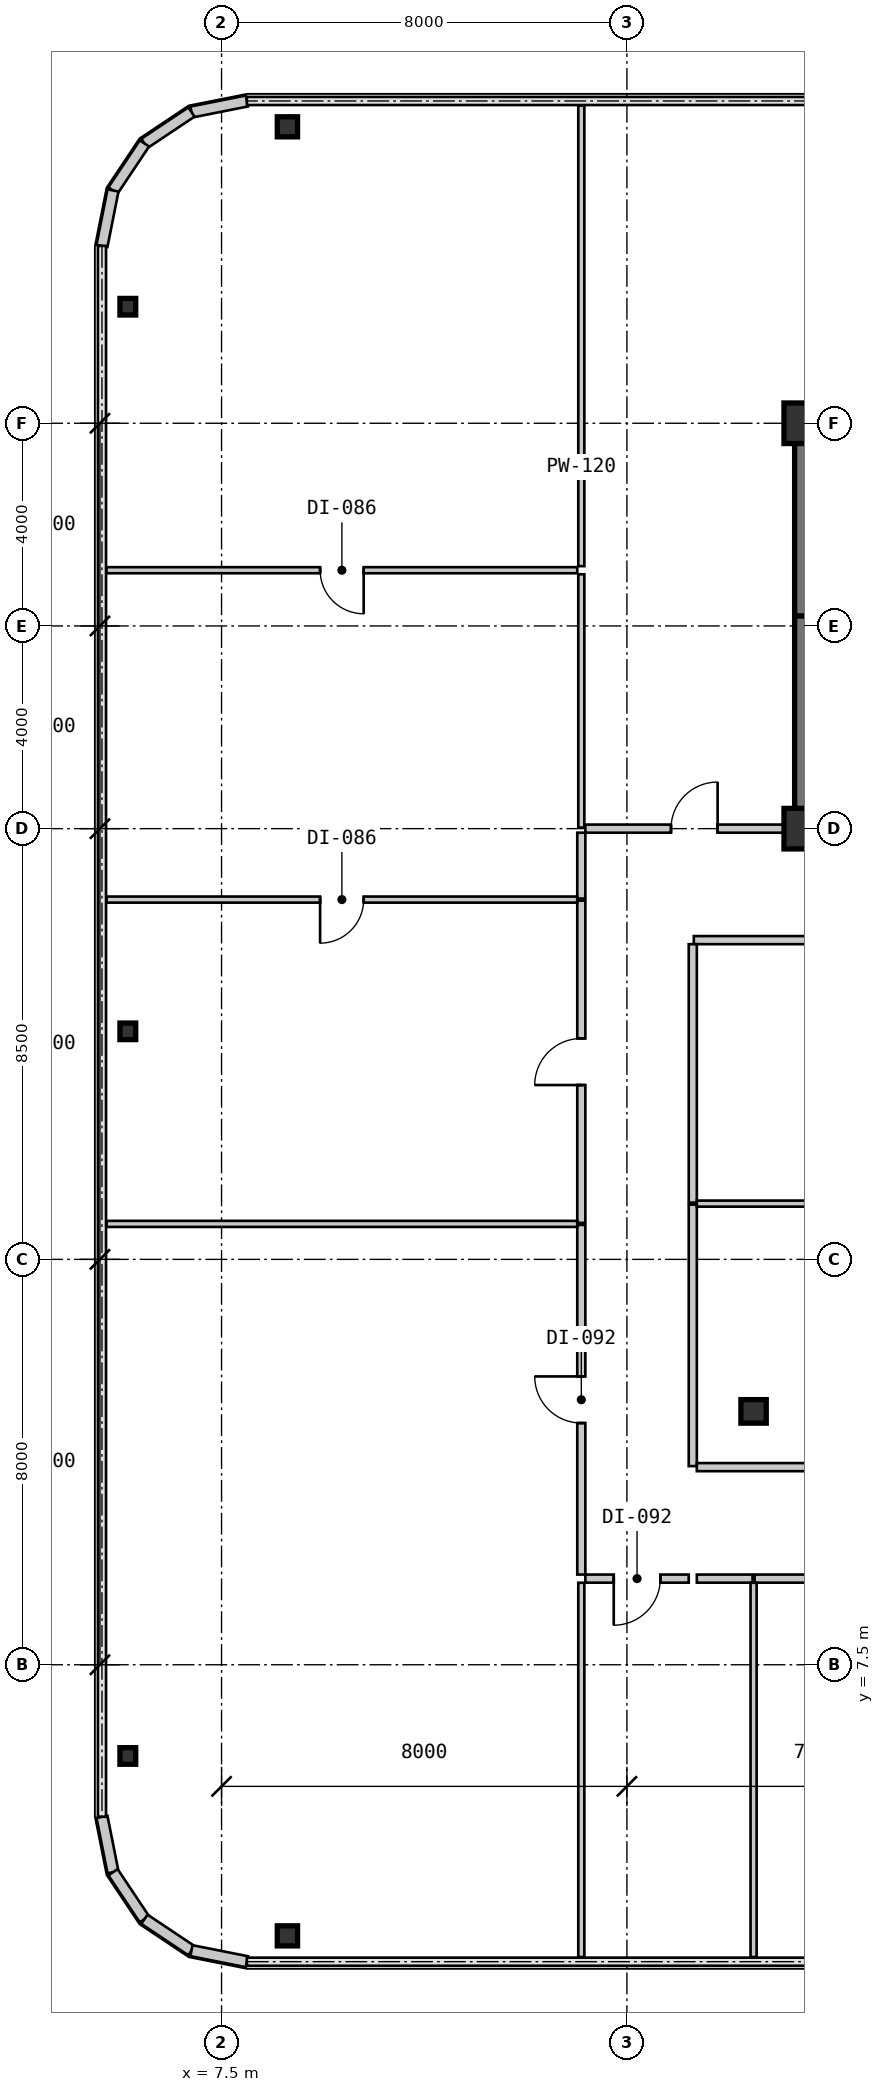
"""IFC4 building model, lengths in metres.
Left out: names, types, materials, properties, quantities, classifications, styles, units other than length and angle.
Written with IfcOpenShell. Run it as: python <this file> out.ifc"""

import sys

from ifc_helpers import new_model, si_unit, direction, frame, frame_2d, origin, origin_2d, place, context, subcontext, project, spatial, rectangle, i_section, extrude, source, transform, mapped, element, fill, save


model = new_model("IFC4")
c1 = context("Model", 3, precision=1e-05, world=origin(), true_north=direction((0.0, 1.0)))
c2 = subcontext(c1, "Body", "Model", "MODEL_VIEW")
j1 = project(units=[si_unit("LENGTHUNIT", "METRE"), si_unit("PLANEANGLEUNIT", "RADIAN")], contexts=[c1])
p1 = place(None, origin())
s1 = spatial("IfcSite", under=j1, at=p1, CompositionType="ELEMENT")
p2 = place(p1, origin())
s2 = spatial("IfcBuilding", under=s1, at=p2, CompositionType="ELEMENT")
p3 = place(p2, frame((0.0, 0.0, 45.15)))
s3 = spatial("IfcBuildingStorey", under=s2, at=p3, CompositionType="ELEMENT", Elevation=45.15)
m1 = source(origin(), c2, "Body", "SweptSolid", [
    extrude(rectangle(XDim=0.8, YDim=0.8, at=origin_2d()), origin(), (0.0, 0.0, 1.0), 3.15),
])
for number, where, z_axis, x_axis in (
    (1, (19.0, 24.0, 0.0), (0.0, 0.0, 1.0), (1.0, 0.0, 0.0)),
    (2, (19.0, 32.0, 0.0), (0.0, 0.0, 1.0), (1.0, 0.0, 0.0)),
):
    element("IfcColumn", number, at=place(p3, frame(where, z_axis=z_axis, x_axis=x_axis)), inside=s3, PredefinedType="COLUMN", context=c2, shape_type="MappedRepresentation", body=[
        mapped(m1, transform((0.0, 0.0, 0.0), scale=1.0)),
    ])
m2 = source(origin(), c2, "Body", "SweptSolid", [
    extrude(i_section(OverallWidth=0.5, OverallDepth=0.464, WebThickness=0.022, FlangeThickness=0.034, at=origin_2d()), origin(), (0.0, 0.0, 1.0), 3.15),
])
p4 = place(p3, frame((18.0, 12.5, 0.0), z_axis=(0.0, 0.0, 1.0), x_axis=(1.0, 0.0, 0.0)))
e3 = element("IfcColumn", 3, at=p4, inside=s3, PredefinedType="COLUMN", context=c2, shape_type="MappedRepresentation", body=[
    mapped(m2, transform((0.0, 0.0, 0.0), scale=1.0)),
])
m3 = source(origin(), c2, "Body", "SweptSolid", [
    extrude(i_section(OverallWidth=0.4, OverallDepth=0.396, WebThickness=0.022, FlangeThickness=0.034, at=origin_2d()), origin(), (0.0, 0.0, 1.0), 3.15),
])
for number, where, z_axis, x_axis in (
    (4, (8.8, 2.15, 0.0), (0.0, 0.0, 1.0), (1.0, 0.0, 0.0)),
    (5, (8.8, 37.85, 0.0), (0.0, 0.0, 1.0), (1.0, 0.0, 0.0)),
):
    element("IfcColumn", number, at=place(p3, frame(where, z_axis=z_axis, x_axis=x_axis)), inside=s3, PredefinedType="COLUMN", context=c2, shape_type="MappedRepresentation", body=[
        mapped(m3, transform((0.0, 0.0, 0.0), scale=1.0)),
    ])
m4 = source(origin(), c2, "Body", "SweptSolid", [
    extrude(i_section(OverallWidth=0.311, OverallDepth=0.327, WebThickness=0.016, FlangeThickness=0.025, at=origin_2d()), origin(), (0.0, 0.0, 1.0), 3.15),
])
for number, where, z_axis, x_axis in (
    (6, (5.65, 5.7, 0.0), (0.0, 0.0, 1.0), (1.0, 0.0, 0.0)),
    (7, (5.65, 20.0, 0.0), (0.0, 0.0, 1.0), (1.0, 0.0, 0.0)),
    (8, (5.65, 34.3, 0.0), (0.0, 0.0, 1.0), (1.0, 0.0, 0.0)),
):
    element("IfcColumn", number, at=place(p3, frame(where, z_axis=z_axis, x_axis=x_axis)), inside=s3, PredefinedType="COLUMN", context=c2, shape_type="MappedRepresentation", body=[
        mapped(m4, transform((0.0, 0.0, 0.0), scale=1.0)),
    ])
m5 = source(origin(), c2, "Body", "SweptSolid", [
    extrude(rectangle(XDim=1.116, YDim=0.22, at=frame_2d((0.558, 0.0))), origin(), (0.0, 0.0, 1.0), 2.93),
])
for number, where, z_axis, x_axis in (
    (9, (8.0, 38.36, 0.0), (0.0, 0.0, 1.0), (-0.981, -0.195, 0.0)),
    (10, (6.906, 38.142, 0.0), (0.0, 0.0, 1.0), (-0.831, -0.556, 0.0)),
    (11, (5.978, 37.522, 0.0), (0.0, 0.0, 1.0), (-0.556, -0.831, 0.0)),
    (12, (5.358, 36.594, 0.0), (0.0, 0.0, 1.0), (-0.195, -0.981, 0.0)),
    (13, (5.14, 4.5, 0.0), (0.0, 0.0, 1.0), (0.195, -0.981, 0.0)),
    (14, (5.358, 3.406, 0.0), (0.0, 0.0, 1.0), (0.556, -0.831, 0.0)),
    (15, (5.978, 2.478, 0.0), (0.0, 0.0, 1.0), (0.831, -0.556, 0.0)),
    (16, (6.906, 1.858, 0.0), (0.0, 0.0, 1.0), (0.981, -0.195, 0.0)),
):
    element("IfcWall", number, at=place(p3, frame(where, z_axis=z_axis, x_axis=x_axis)), inside=s3, PredefinedType="SOLIDWALL", context=c2, shape_type="MappedRepresentation", body=[
        mapped(m5, transform((0.0, 0.0, 0.0), scale=1.0)),
    ])
m6 = source(origin(), c2, "Body", "SweptSolid", [
    extrude(rectangle(XDim=9.19, YDim=0.38, at=frame_2d((4.595, 0.0))), origin(), (0.0, 0.0, 1.0), 2.93),
])
p5 = place(p3, frame((18.81, 32.0, 0.0), z_axis=(0.0, 0.0, 1.0), x_axis=(1.0, 0.0, 0.0)))
e17 = element("IfcWall", 17, at=p5, inside=s3, PredefinedType="SHEAR", context=c2, shape_type="MappedRepresentation", body=[
    mapped(m6, transform((0.0, 0.0, 0.0), scale=1.0)),
])
m7 = source(origin(), c2, "Body", "SweptSolid", [
    extrude(rectangle(XDim=4.01, YDim=0.38, at=frame_2d((2.005, 0.0))), origin(), (0.0, 0.0, 1.0), 2.93),
])
p6 = place(p3, frame((19.0, 24.19, 0.0), z_axis=(0.0, 0.0, 1.0), x_axis=(0.0, 1.0, 0.0)))
e18 = element("IfcWall", 18, at=p6, inside=s3, PredefinedType="SHEAR", context=c2, shape_type="MappedRepresentation", body=[
    mapped(m7, transform((0.0, 0.0, 0.0), scale=1.0)),
])
m8 = source(origin(), c2, "Body", "SweptSolid", [
    extrude(rectangle(XDim=3.61, YDim=0.38, at=frame_2d((1.805, 0.0))), origin(), (0.0, 0.0, 1.0), 2.93),
])
p7 = place(p3, frame((19.0, 28.2, 0.0), z_axis=(0.0, 0.0, 1.0), x_axis=(0.0, 1.0, 0.0)))
e19 = element("IfcWall", 19, at=p7, inside=s3, PredefinedType="SHEAR", context=c2, shape_type="MappedRepresentation", body=[
    mapped(m8, transform((0.0, 0.0, 0.0), scale=1.0)),
])
m9 = source(origin(), c2, "Body", "SweptSolid", [
    extrude(rectangle(XDim=4.98, YDim=0.38, at=frame_2d((2.49, 0.0))), origin(), (0.0, 0.0, 1.0), 2.93),
])
p8 = place(p3, frame((18.81, 24.0, 0.0), z_axis=(0.0, 0.0, 1.0), x_axis=(1.0, 0.0, 0.0)))
e20 = element("IfcWall", 20, at=p8, inside=s3, PredefinedType="SHEAR", context=c2, shape_type="MappedRepresentation", body=[
    mapped(m9, transform((0.0, 0.0, 0.0), scale=1.0)),
])
m10 = source(origin(), c2, "Body", "SweptSolid", [
    extrude(rectangle(XDim=5.16, YDim=0.16, at=frame_2d((2.58, 0.0))), origin(), (0.0, 0.0, 1.0), 2.93),
])
p9 = place(p3, frame((16.8, 16.58, 0.0), z_axis=(0.0, 0.0, 1.0), x_axis=(0.0, -1.0, 0.0)))
e21 = element("IfcWall", 21, at=p9, inside=s3, PredefinedType="PARTITIONING", context=c2, shape_type="MappedRepresentation", body=[
    mapped(m10, transform((0.0, 0.0, 0.0), scale=1.0)),
])
m11 = source(origin(), c2, "Body", "SweptSolid", [
    extrude(rectangle(XDim=11.959, YDim=0.16, at=frame_2d((5.98, 0.0))), origin(), (0.0, 0.0, 1.0), 2.93),
])
p10 = place(p3, frame((28.78, 21.8, 0.0), z_axis=(0.0, 0.0, 1.0), x_axis=(-1.0, 0.0, 0.0)))
e22 = element("IfcWall", 22, at=p10, inside=s3, PredefinedType="PARTITIONING", context=c2, shape_type="MappedRepresentation", body=[
    mapped(m11, transform((0.0, 0.0, 0.0), scale=1.0)),
])
m12 = source(origin(), c2, "Body", "SweptSolid", [
    extrude(rectangle(XDim=1.05, YDim=2.1, at=frame_2d((0.525, 1.05))), frame((0.0, 0.09, 0.0), z_axis=(0.0, -1.0, 0.0), x_axis=(1.0, 0.0, 0.0)), (0.0, 0.0, 1.0), 0.18),
])
p11 = place(p10, frame((5.455, 0.0, 0.0)))
e23 = element("IfcOpeningElement", 23, at=p11, cuts=e22, PredefinedType="OPENING", context=c2, shape_type="MappedRepresentation", body=[
    mapped(m12, transform((0.0, 0.0, 0.0), scale=1.0)),
])
m13 = source(origin(), c2, "Body", "SweptSolid", [
    extrude(rectangle(XDim=5.1, YDim=0.16, at=frame_2d((2.55, 0.0))), origin(), (0.0, 0.0, 1.0), 2.93),
])
p12 = place(p3, frame((16.8, 21.72, 0.0), z_axis=(0.0, 0.0, 1.0), x_axis=(0.0, -1.0, 0.0)))
e24 = element("IfcWall", 24, at=p12, inside=s3, PredefinedType="PARTITIONING", context=c2, shape_type="MappedRepresentation", body=[
    mapped(m13, transform((0.0, 0.0, 0.0), scale=1.0)),
])
m14 = source(origin(), c2, "Body", "SweptSolid", [
    extrude(rectangle(XDim=2.04, YDim=0.16, at=frame_2d((1.02, 0.0))), origin(), (0.0, 0.0, 1.0), 2.93),
])
p13 = place(p3, frame((16.72, 9.2, 0.0), z_axis=(0.0, 0.0, 1.0), x_axis=(-1.0, 0.0, 0.0)))
e25 = element("IfcWall", 25, at=p13, inside=s3, PredefinedType="PARTITIONING", context=c2, shape_type="MappedRepresentation", body=[
    mapped(m14, transform((0.0, 0.0, 0.0), scale=1.0)),
])
m15 = source(origin(), c2, "Body", "SweptSolid", [
    extrude(rectangle(XDim=0.92, YDim=2.1, at=frame_2d((0.46, 1.05))), frame((0.0, 0.09, 0.0), z_axis=(0.0, -1.0, 0.0), x_axis=(1.0, 0.0, 0.0)), (0.0, 0.0, 1.0), 0.18),
])
p14 = place(p13, frame((0.56, 0.0, 0.0)))
e26 = element("IfcOpeningElement", 26, at=p14, cuts=e25, PredefinedType="OPENING", context=c2, shape_type="MappedRepresentation", body=[
    mapped(m15, transform((0.0, 0.0, 0.0), scale=1.0)),
])
m16 = source(origin(), c2, "Body", "SweptSolid", [
    extrude(rectangle(XDim=6.9, YDim=0.16, at=frame_2d((3.45, 0.0))), origin(), (0.0, 0.0, 1.0), 2.93),
])
p15 = place(p3, frame((14.6, 9.28, 0.0), z_axis=(0.0, 0.0, 1.0), x_axis=(0.0, 1.0, 0.0)))
e27 = element("IfcWall", 27, at=p15, inside=s3, PredefinedType="PARTITIONING", context=c2, shape_type="MappedRepresentation", body=[
    mapped(m16, transform((0.0, 0.0, 0.0), scale=1.0)),
])
p16 = place(p15, frame((2.99, 0.0, 0.0)))
e28 = element("IfcOpeningElement", 28, at=p16, cuts=e27, PredefinedType="OPENING", context=c2, shape_type="MappedRepresentation", body=[
    mapped(m15, transform((0.0, 0.0, 0.0), scale=1.0)),
])
m17 = source(origin(), c2, "Body", "SweptSolid", [
    extrude(rectangle(XDim=6.36, YDim=0.16, at=frame_2d((3.18, 0.0))), origin(), (0.0, 0.0, 1.0), 2.93),
])
p17 = place(p3, frame((14.6, 16.22, 0.0), z_axis=(0.0, 0.0, 1.0), x_axis=(0.0, 1.0, 0.0)))
e29 = element("IfcWall", 29, at=p17, inside=s3, PredefinedType="PARTITIONING", context=c2, shape_type="MappedRepresentation", body=[
    mapped(m17, transform((0.0, 0.0, 0.0), scale=1.0)),
])
p18 = place(p17, frame((2.72, 0.0, 0.0)))
e30 = element("IfcOpeningElement", 30, at=p18, cuts=e29, PredefinedType="OPENING", context=c2, shape_type="MappedRepresentation", body=[
    mapped(m15, transform((0.0, 0.0, 0.0), scale=1.0)),
])
m18 = source(origin(), c2, "Body", "SweptSolid", [
    extrude(rectangle(XDim=1.3, YDim=0.16, at=frame_2d((0.65, 0.0))), origin(), (0.0, 0.0, 1.0), 2.93),
])
p19 = place(p3, frame((14.6, 22.62, 0.0), z_axis=(0.0, 0.0, 1.0), x_axis=(0.0, 1.0, 0.0)))
e31 = element("IfcWall", 31, at=p19, inside=s3, PredefinedType="PARTITIONING", context=c2, shape_type="MappedRepresentation", body=[
    mapped(m18, transform((0.0, 0.0, 0.0), scale=1.0)),
])
m19 = source(origin(), c2, "Body", "SweptSolid", [
    extrude(rectangle(XDim=4.13, YDim=0.16, at=frame_2d((2.065, 0.0))), origin(), (0.0, 0.0, 1.0), 2.93),
])
p20 = place(p3, frame((14.68, 24.0, 0.0), z_axis=(0.0, 0.0, 1.0), x_axis=(1.0, 0.0, 0.0)))
e32 = element("IfcWall", 32, at=p20, inside=s3, PredefinedType="PARTITIONING", context=c2, shape_type="MappedRepresentation", body=[
    mapped(m19, transform((0.0, 0.0, 0.0), scale=1.0)),
])
p21 = place(p20, frame((1.69, 0.0, 0.0)))
e33 = element("IfcOpeningElement", 33, at=p21, cuts=e32, PredefinedType="OPENING", context=c2, shape_type="MappedRepresentation", body=[
    mapped(m15, transform((0.0, 0.0, 0.0), scale=1.0)),
])
m20 = source(origin(), c2, "Body", "SweptSolid", [
    extrude(rectangle(XDim=11.9, YDim=0.16, at=frame_2d((5.95, 0.0))), origin(), (0.0, 0.0, 1.0), 2.93),
])
p22 = place(p3, frame((16.88, 11.4, 0.0), z_axis=(0.0, 0.0, 1.0), x_axis=(1.0, 0.0, 0.0)))
e34 = element("IfcWall", 34, at=p22, inside=s3, PredefinedType="PARTITIONING", context=c2, shape_type="MappedRepresentation", body=[
    mapped(m20, transform((0.0, 0.0, 0.0), scale=1.0)),
])
p23 = place(p22, frame((5.425, 0.0, 0.0)))
e35 = element("IfcOpeningElement", 35, at=p23, cuts=e34, PredefinedType="OPENING", context=c2, shape_type="MappedRepresentation", body=[
    mapped(m12, transform((0.0, 0.0, 0.0), scale=1.0)),
])
m21 = source(origin(), c2, "Body", "SweptSolid", [
    extrude(rectangle(XDim=1.1, YDim=0.16, at=frame_2d((0.55, 0.0))), origin(), (0.0, 0.0, 1.0), 2.93),
])
p24 = place(p3, frame((17.98, 9.2, 0.0), z_axis=(0.0, 0.0, 1.0), x_axis=(-1.0, 0.0, 0.0)))
e36 = element("IfcWall", 36, at=p24, inside=s3, PredefinedType="PARTITIONING", context=c2, shape_type="MappedRepresentation", body=[
    mapped(m21, transform((0.0, 0.0, 0.0), scale=1.0)),
])
m22 = source(origin(), c2, "Body", "SweptSolid", [
    extrude(rectangle(XDim=9.959, YDim=0.16, at=frame_2d((4.98, 0.0))), origin(), (0.0, 0.0, 1.0), 2.93),
])
p25 = place(p3, frame((27.98, 9.2, 0.0), z_axis=(0.0, 0.0, 1.0), x_axis=(-1.0, 0.0, 0.0)))
e37 = element("IfcWall", 37, at=p25, inside=s3, PredefinedType="PARTITIONING", context=c2, shape_type="MappedRepresentation", body=[
    mapped(m22, transform((0.0, 0.0, 0.0), scale=1.0)),
])
p26 = place(p25, frame((4.52, 0.0, 0.0)))
e38 = element("IfcOpeningElement", 38, at=p26, cuts=e37, PredefinedType="OPENING", context=c2, shape_type="MappedRepresentation", body=[
    mapped(m15, transform((0.0, 0.0, 0.0), scale=1.0)),
])
m23 = source(origin(), c2, "Body", "SweptSolid", [
    extrude(rectangle(XDim=11.84, YDim=0.12, at=frame_2d((5.92, 0.0))), origin(), (0.0, 0.0, 1.0), 2.93),
])
p27 = place(p3, frame((16.88, 16.6, 0.0), z_axis=(0.0, 0.0, 1.0), x_axis=(1.0, 0.0, 0.0)))
e39 = element("IfcWall", 39, at=p27, inside=s3, PredefinedType="PARTITIONING", context=c2, shape_type="MappedRepresentation", body=[
    mapped(m23, transform((0.0, 0.0, 0.0), scale=1.0)),
])
m24 = source(origin(), c2, "Body", "SweptSolid", [
    extrude(rectangle(XDim=7.386, YDim=0.12, at=frame_2d((3.693, 0.0))), origin(), (0.0, 0.0, 1.0), 2.93),
])
for number, where, z_axis, x_axis in (
    (40, (18.0, 9.118, 0.0), (0.0, 0.0, 1.0), (0.0, -1.0, 0.0)),
    (41, (14.6, 1.732, 0.0), (0.0, 0.0, 1.0), (0.0, 1.0, 0.0)),
):
    element("IfcWall", number, at=place(p3, frame(where, z_axis=z_axis, x_axis=x_axis)), inside=s3, PredefinedType="PARTITIONING", context=c2, shape_type="MappedRepresentation", body=[
        mapped(m24, transform((0.0, 0.0, 0.0), scale=1.0)),
    ])
m25 = source(origin(), c2, "Body", "SweptSolid", [
    extrude(rectangle(XDim=9.29, YDim=0.12, at=frame_2d((4.645, 0.0))), origin(), (0.0, 0.0, 1.0), 2.93),
])
p28 = place(p3, frame((5.23, 16.2, 0.0), z_axis=(0.0, 0.0, 1.0), x_axis=(1.0, 0.0, 0.0)))
e42 = element("IfcWall", 42, at=p28, inside=s3, PredefinedType="PARTITIONING", context=c2, shape_type="MappedRepresentation", body=[
    mapped(m25, transform((0.0, 0.0, 0.0), scale=1.0)),
])
p29 = place(p3, frame((5.23, 22.6, 0.0), z_axis=(0.0, 0.0, 1.0), x_axis=(1.0, 0.0, 0.0)))
e43 = element("IfcWall", 43, at=p29, inside=s3, PredefinedType="PARTITIONING", context=c2, shape_type="MappedRepresentation", body=[
    mapped(m25, transform((0.0, 0.0, 0.0), scale=1.0)),
])
m26 = source(origin(), c2, "Body", "SweptSolid", [
    extrude(rectangle(XDim=0.86, YDim=2.1, at=frame_2d((0.43, 1.05))), frame((0.0, 0.07, 0.0), z_axis=(0.0, -1.0, 0.0), x_axis=(1.0, 0.0, 0.0)), (0.0, 0.0, 1.0), 0.14),
])
p30 = place(p29, frame((4.215, 0.0, 0.0)))
e44 = element("IfcOpeningElement", 44, at=p30, cuts=e43, PredefinedType="OPENING", context=c2, shape_type="MappedRepresentation", body=[
    mapped(m26, transform((0.0, 0.0, 0.0), scale=1.0)),
])
p31 = place(p3, frame((5.23, 29.1, 0.0), z_axis=(0.0, 0.0, 1.0), x_axis=(1.0, 0.0, 0.0)))
e45 = element("IfcWall", 45, at=p31, inside=s3, PredefinedType="PARTITIONING", context=c2, shape_type="MappedRepresentation", body=[
    mapped(m25, transform((0.0, 0.0, 0.0), scale=1.0)),
])
p32 = place(p31, frame((4.215, 0.0, 0.0)))
e46 = element("IfcOpeningElement", 46, at=p32, cuts=e45, PredefinedType="OPENING", context=c2, shape_type="MappedRepresentation", body=[
    mapped(m26, transform((0.0, 0.0, 0.0), scale=1.0)),
])
m27 = source(origin(), c2, "Body", "SweptSolid", [
    extrude(rectangle(XDim=5.0, YDim=0.12, at=frame_2d((2.5, 0.0))), origin(), (0.0, 0.0, 1.0), 2.93),
])
p33 = place(p3, frame((14.6, 29.02, 0.0), z_axis=(0.0, 0.0, 1.0), x_axis=(0.0, -1.0, 0.0)))
e47 = element("IfcWall", 47, at=p33, inside=s3, PredefinedType="PARTITIONING", context=c2, shape_type="MappedRepresentation", body=[
    mapped(m27, transform((0.0, 0.0, 0.0), scale=1.0)),
])
m28 = source(origin(), c2, "Body", "SweptSolid", [
    extrude(rectangle(XDim=9.09, YDim=0.12, at=frame_2d((4.545, 0.0))), origin(), (0.0, 0.0, 1.0), 2.93),
])
p34 = place(p3, frame((14.6, 38.27, 0.0), z_axis=(0.0, 0.0, 1.0), x_axis=(0.0, -1.0, 0.0)))
e48 = element("IfcWall", 48, at=p34, inside=s3, PredefinedType="PARTITIONING", context=c2, shape_type="MappedRepresentation", body=[
    mapped(m28, transform((0.0, 0.0, 0.0), scale=1.0)),
])
m29 = source(origin(), c2, "Body", "SweptSolid", [
    extrude(rectangle(XDim=0.92, YDim=2.1, at=frame_2d((0.46, 1.05))), frame((0.0, 0.025, 0.0), z_axis=(0.0, -1.0, 0.0), x_axis=(1.0, 0.0, 0.0)), (0.0, 0.0, 1.0), 0.05),
])
p35 = place(p14, origin())
e49 = element("IfcDoor", 49, at=p35, inside=s3, OperationType="SINGLE_SWING_RIGHT", PredefinedType="DOOR", context=c2, shape_type="MappedRepresentation", body=[
    mapped(m29, transform((0.0, 0.0, 0.0), scale=1.0)),
])
fill(e26, e49)
p36 = place(p16, origin())
e50 = element("IfcDoor", 50, at=p36, inside=s3, OperationType="SINGLE_SWING_RIGHT", PredefinedType="DOOR", context=c2, shape_type="MappedRepresentation", body=[
    mapped(m29, transform((0.0, 0.0, 0.0), scale=1.0)),
])
fill(e28, e50)
p37 = place(p18, origin())
e51 = element("IfcDoor", 51, at=p37, inside=s3, OperationType="SINGLE_SWING_LEFT", PredefinedType="DOOR", context=c2, shape_type="MappedRepresentation", body=[
    mapped(m29, transform((0.0, 0.0, 0.0), scale=1.0)),
])
fill(e30, e51)
p38 = place(p21, origin())
e52 = element("IfcDoor", 52, at=p38, inside=s3, OperationType="SINGLE_SWING_RIGHT", PredefinedType="DOOR", context=c2, shape_type="MappedRepresentation", body=[
    mapped(m29, transform((0.0, 0.0, 0.0), scale=1.0)),
])
fill(e33, e52)
m30 = source(origin(), c2, "Body", "SweptSolid", [
    extrude(rectangle(XDim=0.86, YDim=2.1, at=frame_2d((0.43, 1.05))), frame((0.0, 0.025, 0.0), z_axis=(0.0, -1.0, 0.0), x_axis=(1.0, 0.0, 0.0)), (0.0, 0.0, 1.0), 0.05),
])
p39 = place(p30, frame((0.86, 0.0, 0.0), z_axis=(0.0, 0.0, 1.0), x_axis=(-1.0, 0.0, 0.0)))
e53 = element("IfcDoor", 53, at=p39, inside=s3, OperationType="SINGLE_SWING_RIGHT", PredefinedType="DOOR", context=c2, shape_type="MappedRepresentation", body=[
    mapped(m30, transform((0.0, 0.0, 0.0), scale=1.0)),
])
fill(e44, e53)
p40 = place(p32, frame((0.86, 0.0, 0.0), z_axis=(0.0, 0.0, 1.0), x_axis=(-1.0, 0.0, 0.0)))
e54 = element("IfcDoor", 54, at=p40, inside=s3, OperationType="SINGLE_SWING_LEFT", PredefinedType="DOOR", context=c2, shape_type="MappedRepresentation", body=[
    mapped(m30, transform((0.0, 0.0, 0.0), scale=1.0)),
])
fill(e46, e54)
save(model, sys.argv[1])
